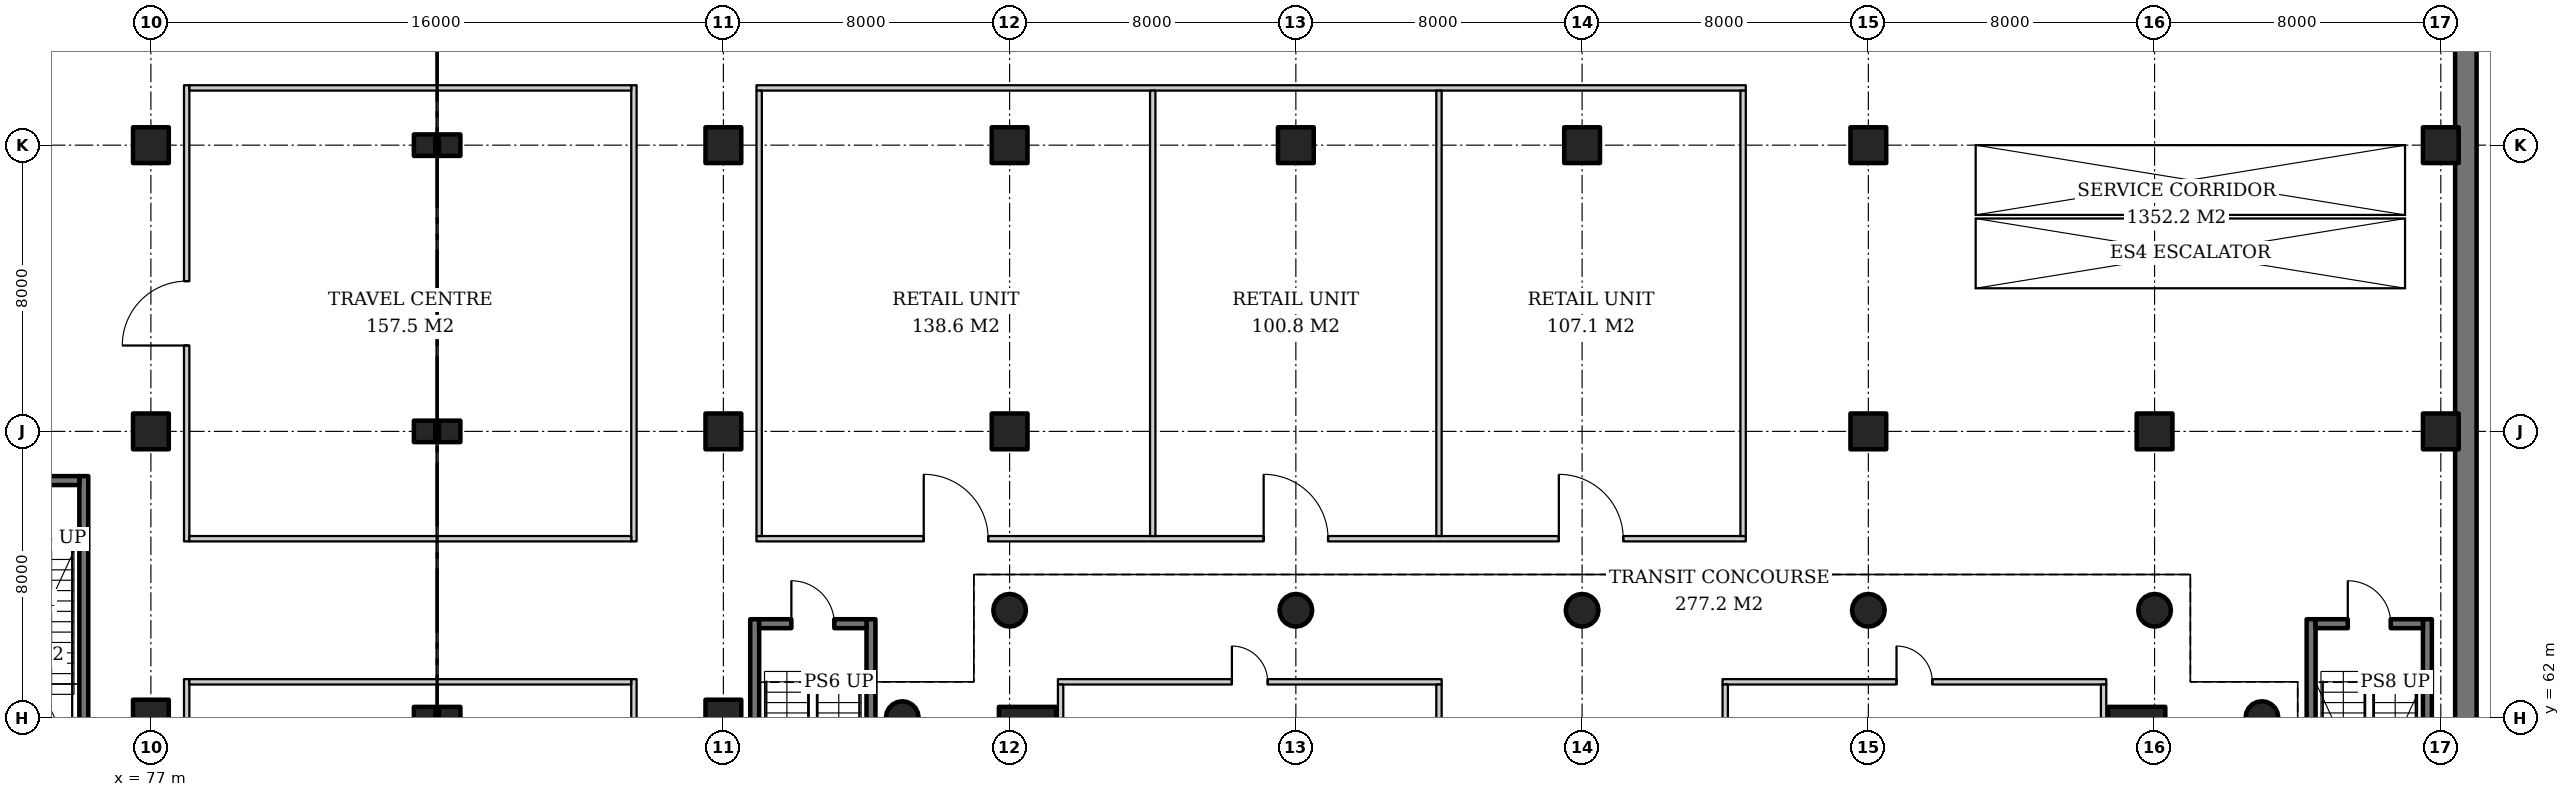
"""IFC4 building model, lengths in metres.
Left out: names, types, materials, properties, quantities, classifications, styles, units other than length and angle.
Written with IfcOpenShell. Run it as: python <this file> out.ifc"""

import sys

from ifc_helpers import new_model, si_unit, direction, frame, frame_2d, origin, origin_2d, place, context, subcontext, project, spatial, rectangle, hollow_circle, extrude, element, fill, save


model = new_model("IFC4")
c1 = context("Model", 3, precision=1e-05, world=origin(), true_north=direction((0.0, 1.0)))
c2 = subcontext(c1, "Body", "Model", "MODEL_VIEW")
j1 = project(units=[si_unit("LENGTHUNIT", "METRE"), si_unit("PLANEANGLEUNIT", "RADIAN")], contexts=[c1])
p1 = place(None, origin())
s1 = spatial("IfcSite", under=j1, at=p1, CompositionType="ELEMENT")
p2 = place(p1, origin())
s2 = spatial("IfcBuilding", under=s1, at=p2, CompositionType="ELEMENT")
p3 = place(p2, frame((0.0, 0.0, -5.0)))
s3 = spatial("IfcBuildingStorey", under=s2, at=p3, CompositionType="ELEMENT", Elevation=-5.0)
for number, where, z_axis, x_axis in (
    (1, (77.0, 62.0, 0.0), (0.0, 0.0, 1.0), (1.0, 0.0, 0.0)),
    (2, (77.0, 70.0, 0.0), (0.0, 0.0, 1.0), (1.0, 0.0, 0.0)),
    (3, (77.0, 78.0, 0.0), (0.0, 0.0, 1.0), (1.0, 0.0, 0.0)),
):
    element("IfcColumn", number, at=place(p3, frame(where, z_axis=z_axis, x_axis=x_axis)), inside=s3, PredefinedType="COLUMN", context=c2, shape_type="SweptSolid", body=[
        extrude(rectangle(XDim=1.0, YDim=1.0, at=origin_2d()), origin(), (0.0, 0.0, 1.0), 5.0),
    ])
for number, where, z_axis, x_axis in (
    (4, (84.65, 62.0, 0.0), (0.0, 0.0, 1.0), (1.0, 0.0, 0.0)),
    (5, (85.35, 62.0, 0.0), (0.0, 0.0, 1.0), (1.0, 0.0, 0.0)),
    (6, (84.65, 70.0, 0.0), (0.0, 0.0, 1.0), (1.0, 0.0, 0.0)),
    (7, (85.35, 70.0, 0.0), (0.0, 0.0, 1.0), (1.0, 0.0, 0.0)),
    (8, (84.65, 78.0, 0.0), (0.0, 0.0, 1.0), (1.0, 0.0, 0.0)),
    (9, (85.35, 78.0, 0.0), (0.0, 0.0, 1.0), (1.0, 0.0, 0.0)),
):
    element("IfcColumn", number, at=place(p3, frame(where, z_axis=z_axis, x_axis=x_axis)), inside=s3, PredefinedType="COLUMN", context=c2, shape_type="SweptSolid", body=[
        extrude(rectangle(XDim=0.6, YDim=0.6, at=origin_2d()), origin(), (0.0, 0.0, 1.0), 5.0),
    ])
for number, where, z_axis, x_axis in (
    (10, (93.0, 62.0, 0.0), (0.0, 0.0, 1.0), (1.0, 0.0, 0.0)),
    (11, (93.0, 70.0, 0.0), (0.0, 0.0, 1.0), (1.0, 0.0, 0.0)),
    (12, (93.0, 78.0, 0.0), (0.0, 0.0, 1.0), (1.0, 0.0, 0.0)),
    (13, (101.0, 70.0, 0.0), (0.0, 0.0, 1.0), (1.0, 0.0, 0.0)),
    (14, (101.0, 78.0, 0.0), (0.0, 0.0, 1.0), (1.0, 0.0, 0.0)),
    (15, (109.0, 78.0, 0.0), (0.0, 0.0, 1.0), (1.0, 0.0, 0.0)),
    (16, (117.0, 78.0, 0.0), (0.0, 0.0, 1.0), (1.0, 0.0, 0.0)),
    (17, (125.0, 70.0, 0.0), (0.0, 0.0, 1.0), (1.0, 0.0, 0.0)),
    (18, (125.0, 78.0, 0.0), (0.0, 0.0, 1.0), (1.0, 0.0, 0.0)),
    (19, (133.0, 70.0, 0.0), (0.0, 0.0, 1.0), (1.0, 0.0, 0.0)),
    (20, (141.0, 70.0, 0.0), (0.0, 0.0, 1.0), (1.0, 0.0, 0.0)),
    (21, (141.0, 78.0, 0.0), (0.0, 0.0, 1.0), (1.0, 0.0, 0.0)),
):
    element("IfcColumn", number, at=place(p3, frame(where, z_axis=z_axis, x_axis=x_axis)), inside=s3, PredefinedType="COLUMN", context=c2, shape_type="SweptSolid", body=[
        extrude(rectangle(XDim=1.0, YDim=1.0, at=origin_2d()), origin(), (0.0, 0.0, 1.0), 5.0),
    ])
p4 = place(p3, frame((141.7, 5.6, 0.0), z_axis=(0.0, 0.0, 1.0), x_axis=(0.0, 1.0, 0.0)))
e22 = element("IfcWall", 22, at=p4, inside=s3, PredefinedType="USERDEFINED", context=c2, shape_type="SweptSolid", body=[
    extrude(rectangle(XDim=88.8, YDim=0.6, at=frame_2d((44.4, 0.0))), origin(), (0.0, 0.0, 1.0), 5.0),
])
p5 = place(p3, frame((132.5, 61.5, 0.0), z_axis=(0.0, 0.0, 1.0), x_axis=(1.0, 0.0, 0.0)))
e23 = element("IfcColumn", 23, at=p5, inside=s3, PredefinedType="COLUMN", context=c2, shape_type="SweptSolid", body=[
    extrude(rectangle(XDim=1.6, YDim=1.6, at=origin_2d()), origin(), (0.0, 0.0, 1.0), 5.0),
])
p6 = place(p3, frame((136.0, 62.0, 0.0), z_axis=(0.0, 0.0, 1.0), x_axis=(1.0, 0.0, 0.0)))
e24 = element("IfcColumn", 24, at=p6, inside=s3, PredefinedType="COLUMN", context=c2, shape_type="SweptSolid", body=[
    extrude(hollow_circle(Radius=0.457, WallThickness=0.03, at=origin_2d()), origin(), (0.0, 0.0, 1.0), 5.0),
])
p7 = place(p3, frame((101.5, 61.5, 0.0), z_axis=(0.0, 0.0, 1.0), x_axis=(1.0, 0.0, 0.0)))
e25 = element("IfcColumn", 25, at=p7, inside=s3, PredefinedType="COLUMN", context=c2, shape_type="SweptSolid", body=[
    extrude(rectangle(XDim=1.6, YDim=1.6, at=origin_2d()), origin(), (0.0, 0.0, 1.0), 5.0),
])
for number, where, z_axis, x_axis in (
    (26, (133.0, 65.0, 0.0), (0.0, 0.0, 1.0), (1.0, 0.0, 0.0)),
    (27, (101.0, 65.0, 0.0), (0.0, 0.0, 1.0), (1.0, 0.0, 0.0)),
    (28, (125.0, 65.0, 0.0), (0.0, 0.0, 1.0), (1.0, 0.0, 0.0)),
    (29, (117.0, 65.0, 0.0), (0.0, 0.0, 1.0), (1.0, 0.0, 0.0)),
    (30, (109.0, 65.0, 0.0), (0.0, 0.0, 1.0), (1.0, 0.0, 0.0)),
    (31, (98.0, 62.0, 0.0), (0.0, 0.0, 1.0), (1.0, 0.0, 0.0)),
):
    element("IfcColumn", number, at=place(p3, frame(where, z_axis=z_axis, x_axis=x_axis)), inside=s3, PredefinedType="COLUMN", context=c2, shape_type="SweptSolid", body=[
        extrude(hollow_circle(Radius=0.457, WallThickness=0.03, at=origin_2d()), origin(), (0.0, 0.0, 1.0), 5.0),
    ])
p8 = place(p3, frame((75.125, 60.25, 0.0), z_axis=(0.0, 0.0, 1.0), x_axis=(0.0, 1.0, 0.0)))
e32 = element("IfcWall", 32, at=p8, inside=s3, PredefinedType="SOLIDWALL", context=c2, shape_type="SweptSolid", body=[
    extrude(rectangle(XDim=8.5, YDim=0.25, at=frame_2d((4.25, 0.0))), origin(), (0.0, 0.0, 1.0), 4.6),
])
p9 = place(p3, frame((72.0, 68.625, 0.0), z_axis=(0.0, 0.0, 1.0), x_axis=(1.0, 0.0, 0.0)))
e33 = element("IfcWall", 33, at=p9, inside=s3, PredefinedType="SOLIDWALL", context=c2, shape_type="SweptSolid", body=[
    extrude(rectangle(XDim=3.0, YDim=0.25, at=frame_2d((1.5, 0.0))), origin(), (0.0, 0.0, 1.0), 4.6),
])
p10 = place(p9, frame((0.9, 0.0, 0.0)))
e34 = element("IfcOpeningElement", 34, at=p10, cuts=e33, PredefinedType="OPENING", context=c2, shape_type="SweptSolid", body=[
    extrude(rectangle(XDim=1.2, YDim=2.1, at=frame_2d((0.6, 1.05))), frame((0.0, 0.135, 0.0), z_axis=(0.0, -1.0, 0.0), x_axis=(1.0, 0.0, 0.0)), (0.0, 0.0, 1.0), 0.27),
])
for number, where, z_axis, x_axis in (
    (35, (93.875, 56.25, 0.0), (0.0, 0.0, 1.0), (0.0, 1.0, 0.0)),
    (36, (97.125, 56.25, 0.0), (0.0, 0.0, 1.0), (0.0, 1.0, 0.0)),
):
    element("IfcWall", number, at=place(p3, frame(where, z_axis=z_axis, x_axis=x_axis)), inside=s3, PredefinedType="SOLIDWALL", context=c2, shape_type="SweptSolid", body=[
        extrude(rectangle(XDim=8.5, YDim=0.25, at=frame_2d((4.25, 0.0))), origin(), (0.0, 0.0, 1.0), 4.6),
    ])
p11 = place(p3, frame((94.0, 64.625, 0.0), z_axis=(0.0, 0.0, 1.0), x_axis=(1.0, 0.0, 0.0)))
e37 = element("IfcWall", 37, at=p11, inside=s3, PredefinedType="SOLIDWALL", context=c2, shape_type="SweptSolid", body=[
    extrude(rectangle(XDim=3.0, YDim=0.25, at=frame_2d((1.5, 0.0))), origin(), (0.0, 0.0, 1.0), 4.6),
])
p12 = place(p11, frame((0.9, 0.0, 0.0)))
e38 = element("IfcOpeningElement", 38, at=p12, cuts=e37, PredefinedType="OPENING", context=c2, shape_type="SweptSolid", body=[
    extrude(rectangle(XDim=1.2, YDim=2.1, at=frame_2d((0.6, 1.05))), frame((0.0, 0.135, 0.0), z_axis=(0.0, -1.0, 0.0), x_axis=(1.0, 0.0, 0.0)), (0.0, 0.0, 1.0), 0.27),
])
for number, where, z_axis, x_axis in (
    (39, (137.375, 56.25, 0.0), (0.0, 0.0, 1.0), (0.0, 1.0, 0.0)),
    (40, (140.625, 56.25, 0.0), (0.0, 0.0, 1.0), (0.0, 1.0, 0.0)),
):
    element("IfcWall", number, at=place(p3, frame(where, z_axis=z_axis, x_axis=x_axis)), inside=s3, PredefinedType="SOLIDWALL", context=c2, shape_type="SweptSolid", body=[
        extrude(rectangle(XDim=8.5, YDim=0.25, at=frame_2d((4.25, 0.0))), origin(), (0.0, 0.0, 1.0), 4.6),
    ])
p13 = place(p3, frame((137.5, 64.625, 0.0), z_axis=(0.0, 0.0, 1.0), x_axis=(1.0, 0.0, 0.0)))
e41 = element("IfcWall", 41, at=p13, inside=s3, PredefinedType="SOLIDWALL", context=c2, shape_type="SweptSolid", body=[
    extrude(rectangle(XDim=3.0, YDim=0.25, at=frame_2d((1.5, 0.0))), origin(), (0.0, 0.0, 1.0), 4.6),
])
p14 = place(p13, frame((0.9, 0.0, 0.0)))
e42 = element("IfcOpeningElement", 42, at=p14, cuts=e41, PredefinedType="OPENING", context=c2, shape_type="SweptSolid", body=[
    extrude(rectangle(XDim=1.2, YDim=2.1, at=frame_2d((0.6, 1.05))), frame((0.0, 0.135, 0.0), z_axis=(0.0, -1.0, 0.0), x_axis=(1.0, 0.0, 0.0)), (0.0, 0.0, 1.0), 0.27),
])
p15 = place(p3, frame((78.0, 12.325, 0.0), z_axis=(0.0, 0.0, 1.0), x_axis=(0.0, 1.0, 0.0)))
e43 = element("IfcWall", 43, at=p15, inside=s3, PredefinedType="PARTITIONING", context=c2, shape_type="SweptSolid", body=[
    extrude(rectangle(XDim=50.75, YDim=0.15, at=frame_2d((25.375, 0.0))), origin(), (0.0, 0.0, 1.0), 4.6),
])
p16 = place(p15, frame((5.975, 0.0, 0.0)))
e44 = element("IfcOpeningElement", 44, at=p16, cuts=e43, PredefinedType="OPENING", context=c2, shape_type="SweptSolid", body=[
    extrude(rectangle(XDim=1.8, YDim=2.4, at=frame_2d((0.9, 1.2))), frame((0.0, 0.085, 0.0), z_axis=(0.0, -1.0, 0.0), x_axis=(1.0, 0.0, 0.0)), (0.0, 0.0, 1.0), 0.17),
])
p17 = place(p15, frame((20.775, 0.0, 0.0)))
e45 = element("IfcOpeningElement", 45, at=p17, cuts=e43, PredefinedType="OPENING", context=c2, shape_type="SweptSolid", body=[
    extrude(rectangle(XDim=1.8, YDim=2.4, at=frame_2d((0.9, 1.2))), frame((0.0, 0.085, 0.0), z_axis=(0.0, -1.0, 0.0), x_axis=(1.0, 0.0, 0.0)), (0.0, 0.0, 1.0), 0.17),
])
p18 = place(p15, frame((39.275, 0.0, 0.0)))
e46 = element("IfcOpeningElement", 46, at=p18, cuts=e43, PredefinedType="OPENING", context=c2, shape_type="SweptSolid", body=[
    extrude(rectangle(XDim=1.8, YDim=2.4, at=frame_2d((0.9, 1.2))), frame((0.0, 0.085, 0.0), z_axis=(0.0, -1.0, 0.0), x_axis=(1.0, 0.0, 0.0)), (0.0, 0.0, 1.0), 0.17),
])
p19 = place(p3, frame((90.5, 12.325, 0.0), z_axis=(0.0, 0.0, 1.0), x_axis=(0.0, 1.0, 0.0)))
e47 = element("IfcWall", 47, at=p19, inside=s3, PredefinedType="PARTITIONING", context=c2, shape_type="SweptSolid", body=[
    extrude(rectangle(XDim=50.75, YDim=0.15, at=frame_2d((25.375, 0.0))), origin(), (0.0, 0.0, 1.0), 4.6),
])
p20 = place(p3, frame((78.075, 63.0, 0.0), z_axis=(0.0, 0.0, 1.0), x_axis=(1.0, 0.0, 0.0)))
e48 = element("IfcWall", 48, at=p20, inside=s3, PredefinedType="PARTITIONING", context=c2, shape_type="SweptSolid", body=[
    extrude(rectangle(XDim=12.35, YDim=0.15, at=frame_2d((6.175, 0.0))), origin(), (0.0, 0.0, 1.0), 4.6),
])
p21 = place(p3, frame((78.0, 66.925, 0.0), z_axis=(0.0, 0.0, 1.0), x_axis=(0.0, 1.0, 0.0)))
e49 = element("IfcWall", 49, at=p21, inside=s3, PredefinedType="PARTITIONING", context=c2, shape_type="SweptSolid", body=[
    extrude(rectangle(XDim=12.75, YDim=0.15, at=frame_2d((6.375, 0.0))), origin(), (0.0, 0.0, 1.0), 4.6),
])
p22 = place(p21, frame((5.475, 0.0, 0.0)))
e50 = element("IfcOpeningElement", 50, at=p22, cuts=e49, PredefinedType="OPENING", context=c2, shape_type="SweptSolid", body=[
    extrude(rectangle(XDim=1.8, YDim=2.4, at=frame_2d((0.9, 1.2))), frame((0.0, 0.085, 0.0), z_axis=(0.0, -1.0, 0.0), x_axis=(1.0, 0.0, 0.0)), (0.0, 0.0, 1.0), 0.17),
])
p23 = place(p3, frame((90.5, 66.925, 0.0), z_axis=(0.0, 0.0, 1.0), x_axis=(0.0, 1.0, 0.0)))
e51 = element("IfcWall", 51, at=p23, inside=s3, PredefinedType="PARTITIONING", context=c2, shape_type="SweptSolid", body=[
    extrude(rectangle(XDim=12.75, YDim=0.15, at=frame_2d((6.375, 0.0))), origin(), (0.0, 0.0, 1.0), 4.6),
])
for number, where, z_axis, x_axis in (
    (52, (78.075, 67.0, 0.0), (0.0, 0.0, 1.0), (1.0, 0.0, 0.0)),
    (53, (78.075, 79.6, 0.0), (0.0, 0.0, 1.0), (1.0, 0.0, 0.0)),
):
    element("IfcWall", number, at=place(p3, frame(where, z_axis=z_axis, x_axis=x_axis)), inside=s3, PredefinedType="PARTITIONING", context=c2, shape_type="SweptSolid", body=[
        extrude(rectangle(XDim=12.35, YDim=0.15, at=frame_2d((6.175, 0.0))), origin(), (0.0, 0.0, 1.0), 4.6),
    ])
p24 = place(p3, frame((102.35, 63.0, 0.0), z_axis=(0.0, 0.0, 1.0), x_axis=(1.0, 0.0, 0.0)))
e54 = element("IfcWall", 54, at=p24, inside=s3, PredefinedType="PARTITIONING", context=c2, shape_type="SweptSolid", body=[
    extrude(rectangle(XDim=10.725, YDim=0.15, at=frame_2d((5.362, 0.0))), origin(), (0.0, 0.0, 1.0), 3.947),
])
p25 = place(p24, frame((4.863, 0.0, 0.0)))
e55 = element("IfcOpeningElement", 55, at=p25, cuts=e54, PredefinedType="OPENING", context=c2, shape_type="SweptSolid", body=[
    extrude(rectangle(XDim=1.0, YDim=2.1, at=frame_2d((0.5, 1.05))), frame((0.0, 0.085, 0.0), z_axis=(0.0, -1.0, 0.0), x_axis=(1.0, 0.0, 0.0)), (0.0, 0.0, 1.0), 0.17),
])
for number, where, z_axis, x_axis in (
    (56, (102.425, 59.375, 0.0), (0.0, 0.0, 1.0), (0.0, 1.0, 0.0)),
    (57, (113.0, 59.375, 0.0), (0.0, 0.0, 1.0), (0.0, 1.0, 0.0)),
):
    element("IfcWall", number, at=place(p3, frame(where, z_axis=z_axis, x_axis=x_axis)), inside=s3, PredefinedType="PARTITIONING", context=c2, shape_type="SweptSolid", body=[
        extrude(rectangle(XDim=3.55, YDim=0.15, at=frame_2d((1.775, 0.0))), origin(), (0.0, 0.0, 1.0), 4.7),
    ])
p26 = place(p3, frame((120.925, 63.0, 0.0), z_axis=(0.0, 0.0, 1.0), x_axis=(1.0, 0.0, 0.0)))
e58 = element("IfcWall", 58, at=p26, inside=s3, PredefinedType="PARTITIONING", context=c2, shape_type="SweptSolid", body=[
    extrude(rectangle(XDim=10.725, YDim=0.15, at=frame_2d((5.362, 0.0))), origin(), (0.0, 0.0, 1.0), 3.9),
])
p27 = place(p26, frame((4.863, 0.0, 0.0)))
e59 = element("IfcOpeningElement", 59, at=p27, cuts=e58, PredefinedType="OPENING", context=c2, shape_type="SweptSolid", body=[
    extrude(rectangle(XDim=1.0, YDim=2.1, at=frame_2d((0.5, 1.05))), frame((0.0, 0.085, 0.0), z_axis=(0.0, -1.0, 0.0), x_axis=(1.0, 0.0, 0.0)), (0.0, 0.0, 1.0), 0.17),
])
for number, where, z_axis, x_axis in (
    (60, (121.0, 59.375, 0.0), (0.0, 0.0, 1.0), (0.0, 1.0, 0.0)),
    (61, (131.575, 59.375, 0.0), (0.0, 0.0, 1.0), (0.0, 1.0, 0.0)),
):
    element("IfcWall", number, at=place(p3, frame(where, z_axis=z_axis, x_axis=x_axis)), inside=s3, PredefinedType="PARTITIONING", context=c2, shape_type="SweptSolid", body=[
        extrude(rectangle(XDim=3.55, YDim=0.15, at=frame_2d((1.775, 0.0))), origin(), (0.0, 0.0, 1.0), 4.7),
    ])
p28 = place(p3, frame((93.925, 67.0, 0.0), z_axis=(0.0, 0.0, 1.0), x_axis=(1.0, 0.0, 0.0)))
e62 = element("IfcWall", 62, at=p28, inside=s3, PredefinedType="PARTITIONING", context=c2, shape_type="SweptSolid", body=[
    extrude(rectangle(XDim=27.65, YDim=0.15, at=frame_2d((13.825, 0.0))), origin(), (0.0, 0.0, 1.0), 4.6),
])
p29 = place(p28, frame((4.675, 0.0, 0.0)))
e63 = element("IfcOpeningElement", 63, at=p29, cuts=e62, PredefinedType="OPENING", context=c2, shape_type="SweptSolid", body=[
    extrude(rectangle(XDim=1.8, YDim=2.4, at=frame_2d((0.9, 1.2))), frame((0.0, 0.085, 0.0), z_axis=(0.0, -1.0, 0.0), x_axis=(1.0, 0.0, 0.0)), (0.0, 0.0, 1.0), 0.17),
])
p30 = place(p28, frame((14.175, 0.0, 0.0)))
e64 = element("IfcOpeningElement", 64, at=p30, cuts=e62, PredefinedType="OPENING", context=c2, shape_type="SweptSolid", body=[
    extrude(rectangle(XDim=1.8, YDim=2.4, at=frame_2d((0.9, 1.2))), frame((0.0, 0.085, 0.0), z_axis=(0.0, -1.0, 0.0), x_axis=(1.0, 0.0, 0.0)), (0.0, 0.0, 1.0), 0.17),
])
p31 = place(p28, frame((22.425, 0.0, 0.0)))
e65 = element("IfcOpeningElement", 65, at=p31, cuts=e62, PredefinedType="OPENING", context=c2, shape_type="SweptSolid", body=[
    extrude(rectangle(XDim=1.8, YDim=2.4, at=frame_2d((0.9, 1.2))), frame((0.0, 0.085, 0.0), z_axis=(0.0, -1.0, 0.0), x_axis=(1.0, 0.0, 0.0)), (0.0, 0.0, 1.0), 0.17),
])
p32 = place(p3, frame((93.925, 79.6, 0.0), z_axis=(0.0, 0.0, 1.0), x_axis=(1.0, 0.0, 0.0)))
e66 = element("IfcWall", 66, at=p32, inside=s3, PredefinedType="PARTITIONING", context=c2, shape_type="SweptSolid", body=[
    extrude(rectangle(XDim=27.65, YDim=0.15, at=frame_2d((13.825, 0.0))), origin(), (0.0, 0.0, 1.0), 4.6),
])
for number, where, z_axis, x_axis in (
    (67, (94.0, 67.075, 0.0), (0.0, 0.0, 1.0), (0.0, 1.0, 0.0)),
    (68, (121.5, 67.075, 0.0), (0.0, 0.0, 1.0), (0.0, 1.0, 0.0)),
    (69, (105.0, 67.075, 0.0), (0.0, 0.0, 1.0), (0.0, 1.0, 0.0)),
    (70, (113.0, 67.075, 0.0), (0.0, 0.0, 1.0), (0.0, 1.0, 0.0)),
):
    element("IfcWall", number, at=place(p3, frame(where, z_axis=z_axis, x_axis=x_axis)), inside=s3, PredefinedType="PARTITIONING", context=c2, shape_type="SweptSolid", body=[
        extrude(rectangle(XDim=12.45, YDim=0.15, at=frame_2d((6.225, 0.0))), origin(), (0.0, 0.0, 1.0), 4.6),
    ])
p33 = place(p12, origin())
e71 = element("IfcDoor", 71, at=p33, inside=s3, OperationType="SINGLE_SWING_LEFT", PredefinedType="DOOR", context=c2, shape_type="SweptSolid", body=[
    extrude(rectangle(XDim=1.2, YDim=2.1, at=frame_2d((0.6, 1.05))), frame((0.0, 0.025, 0.0), z_axis=(0.0, -1.0, 0.0), x_axis=(1.0, 0.0, 0.0)), (0.0, 0.0, 1.0), 0.05),
])
fill(e38, e71)
p34 = place(p14, origin())
e72 = element("IfcDoor", 72, at=p34, inside=s3, OperationType="SINGLE_SWING_LEFT", PredefinedType="DOOR", context=c2, shape_type="SweptSolid", body=[
    extrude(rectangle(XDim=1.2, YDim=2.1, at=frame_2d((0.6, 1.05))), frame((0.0, 0.025, 0.0), z_axis=(0.0, -1.0, 0.0), x_axis=(1.0, 0.0, 0.0)), (0.0, 0.0, 1.0), 0.05),
])
fill(e42, e72)
p35 = place(p22, origin())
e73 = element("IfcDoor", 73, at=p35, inside=s3, OperationType="DOUBLE_DOOR_SINGLE_SWING", PredefinedType="DOOR", context=c2, shape_type="SweptSolid", body=[
    extrude(rectangle(XDim=1.8, YDim=2.4, at=frame_2d((0.9, 1.2))), frame((0.0, 0.025, 0.0), z_axis=(0.0, -1.0, 0.0), x_axis=(1.0, 0.0, 0.0)), (0.0, 0.0, 1.0), 0.05),
])
fill(e50, e73)
p36 = place(p25, origin())
e74 = element("IfcDoor", 74, at=p36, inside=s3, OperationType="SINGLE_SWING_LEFT", PredefinedType="DOOR", context=c2, shape_type="SweptSolid", body=[
    extrude(rectangle(XDim=1.0, YDim=2.1, at=frame_2d((0.5, 1.05))), frame((0.0, 0.025, 0.0), z_axis=(0.0, -1.0, 0.0), x_axis=(1.0, 0.0, 0.0)), (0.0, 0.0, 1.0), 0.05),
])
fill(e55, e74)
p37 = place(p27, origin())
e75 = element("IfcDoor", 75, at=p37, inside=s3, OperationType="SINGLE_SWING_LEFT", PredefinedType="DOOR", context=c2, shape_type="SweptSolid", body=[
    extrude(rectangle(XDim=1.0, YDim=2.1, at=frame_2d((0.5, 1.05))), frame((0.0, 0.025, 0.0), z_axis=(0.0, -1.0, 0.0), x_axis=(1.0, 0.0, 0.0)), (0.0, 0.0, 1.0), 0.05),
])
fill(e59, e75)
p38 = place(p29, origin())
e76 = element("IfcDoor", 76, at=p38, inside=s3, OperationType="DOUBLE_DOOR_SINGLE_SWING", PredefinedType="DOOR", context=c2, shape_type="SweptSolid", body=[
    extrude(rectangle(XDim=1.8, YDim=2.4, at=frame_2d((0.9, 1.2))), frame((0.0, 0.025, 0.0), z_axis=(0.0, -1.0, 0.0), x_axis=(1.0, 0.0, 0.0)), (0.0, 0.0, 1.0), 0.05),
])
fill(e63, e76)
p39 = place(p30, origin())
e77 = element("IfcDoor", 77, at=p39, inside=s3, OperationType="DOUBLE_DOOR_SINGLE_SWING", PredefinedType="DOOR", context=c2, shape_type="SweptSolid", body=[
    extrude(rectangle(XDim=1.8, YDim=2.4, at=frame_2d((0.9, 1.2))), frame((0.0, 0.025, 0.0), z_axis=(0.0, -1.0, 0.0), x_axis=(1.0, 0.0, 0.0)), (0.0, 0.0, 1.0), 0.05),
])
fill(e64, e77)
p40 = place(p31, origin())
e78 = element("IfcDoor", 78, at=p40, inside=s3, OperationType="DOUBLE_DOOR_SINGLE_SWING", PredefinedType="DOOR", context=c2, shape_type="SweptSolid", body=[
    extrude(rectangle(XDim=1.8, YDim=2.4, at=frame_2d((0.9, 1.2))), frame((0.0, 0.025, 0.0), z_axis=(0.0, -1.0, 0.0), x_axis=(1.0, 0.0, 0.0)), (0.0, 0.0, 1.0), 0.05),
])
fill(e65, e78)
save(model, sys.argv[1])
